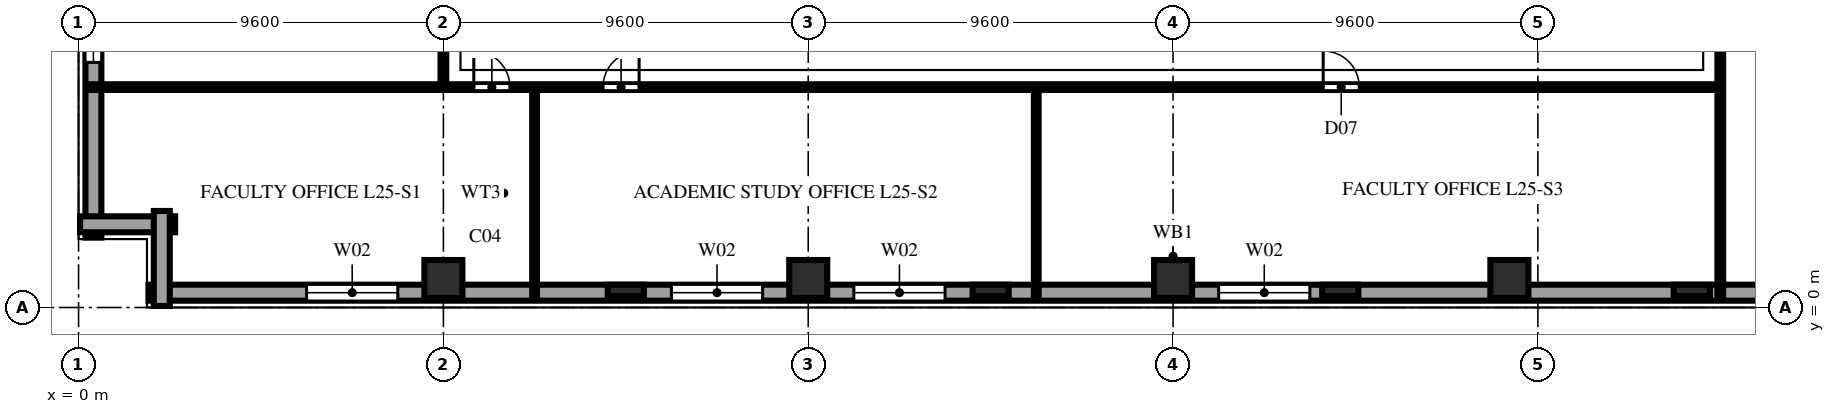
"""IFC4 building model, lengths in metres.
Left out: names, types, materials, properties, quantities, classifications, styles, units other than length and angle.
Written with IfcOpenShell. Run it as: python <this file> out.ifc"""

import sys

from ifc_helpers import new_model, si_unit, direction, frame, frame_2d, origin, origin_2d, place, context, subcontext, project, spatial, rectangle, extrude, element, fill, save


model = new_model("IFC4")
c1 = context("Model", 3, precision=1e-05, world=origin(), true_north=direction((0.0, 1.0)))
c2 = subcontext(c1, "Body", "Model", "MODEL_VIEW")
j1 = project(units=[si_unit("LENGTHUNIT", "METRE"), si_unit("PLANEANGLEUNIT", "RADIAN")], contexts=[c1])
p1 = place(None, origin())
s1 = spatial("IfcSite", under=j1, at=p1, CompositionType="ELEMENT")
p2 = place(p1, origin())
s2 = spatial("IfcBuilding", under=s1, at=p2, CompositionType="ELEMENT")
p3 = place(p2, frame((0.0, 0.0, 101.4)))
s3 = spatial("IfcBuildingStorey", under=s2, at=p3, CompositionType="ELEMENT", Elevation=101.4)
for number, where, z_axis, x_axis in (
    (1, (9.6, 0.75, 0.0), (0.0, 0.0, 1.0), (1.0, 0.0, 0.0)),
    (2, (19.2, 0.75, 0.0), (0.0, 0.0, 1.0), (1.0, 0.0, 0.0)),
    (3, (28.8, 0.75, 0.0), (0.0, 0.0, 1.0), (1.0, 0.0, 0.0)),
    (4, (37.65, 0.75, 0.0), (0.0, 0.0, 1.0), (1.0, 0.0, 0.0)),
):
    element("IfcColumn", number, at=place(p3, frame(where, z_axis=z_axis, x_axis=x_axis)), inside=s3, PredefinedType="COLUMN", context=c2, shape_type="SweptSolid", body=[
        extrude(rectangle(XDim=1.0, YDim=1.0, at=origin_2d()), origin(), (0.0, 0.0, 1.0), 3.8),
    ])
for number, where, z_axis, x_axis in (
    (5, (14.4, 0.45, 0.0), (0.0, 0.0, 1.0), (1.0, 0.0, 0.0)),
    (6, (24.0, 0.45, 0.0), (0.0, 0.0, 1.0), (1.0, 0.0, 0.0)),
    (7, (33.2, 0.45, 0.0), (0.0, 0.0, 1.0), (1.0, 0.0, 0.0)),
    (8, (42.45, 0.45, 0.0), (0.0, 0.0, 1.0), (1.0, 0.0, 0.0)),
):
    element("IfcColumn", number, at=place(p3, frame(where, z_axis=z_axis, x_axis=x_axis)), inside=s3, PredefinedType="PILASTER", context=c2, shape_type="SweptSolid", body=[
        extrude(rectangle(XDim=0.95, YDim=0.3, at=origin_2d()), origin(), (0.0, 0.0, 1.0), 3.8),
    ])
p4 = place(p3, frame((1.84, 0.39, 0.0), z_axis=(0.0, 0.0, 1.0), x_axis=(1.0, 0.0, 0.0)))
e9 = element("IfcWall", 9, at=p4, inside=s3, PredefinedType="SOLIDWALL", context=c2, shape_type="SweptSolid", body=[
    extrude(rectangle(XDim=53.92, YDim=0.42, at=frame_2d((26.96, 0.0))), origin(), (0.0, 0.0, 1.0), 3.54),
])
p5 = place(p4, frame((4.16, 0.0, 0.85)))
e10 = element("IfcOpeningElement", 10, at=p5, cuts=e9, PredefinedType="OPENING", context=c2, shape_type="SweptSolid", body=[
    extrude(rectangle(XDim=2.4, YDim=1.85, at=frame_2d((1.2, 0.925))), frame((0.0, 0.222, 0.0), z_axis=(0.0, -1.0, 0.0), x_axis=(1.0, 0.0, 0.0)), (0.0, 0.0, 1.0), 0.444),
])
p6 = place(p4, frame((13.76, 0.0, 0.85)))
e11 = element("IfcOpeningElement", 11, at=p6, cuts=e9, PredefinedType="OPENING", context=c2, shape_type="SweptSolid", body=[
    extrude(rectangle(XDim=2.4, YDim=1.85, at=frame_2d((1.2, 0.925))), frame((0.0, 0.222, 0.0), z_axis=(0.0, -1.0, 0.0), x_axis=(1.0, 0.0, 0.0)), (0.0, 0.0, 1.0), 0.444),
])
p7 = place(p4, frame((18.56, 0.0, 0.85)))
e12 = element("IfcOpeningElement", 12, at=p7, cuts=e9, PredefinedType="OPENING", context=c2, shape_type="SweptSolid", body=[
    extrude(rectangle(XDim=2.4, YDim=1.85, at=frame_2d((1.2, 0.925))), frame((0.0, 0.222, 0.0), z_axis=(0.0, -1.0, 0.0), x_axis=(1.0, 0.0, 0.0)), (0.0, 0.0, 1.0), 0.444),
])
p8 = place(p4, frame((28.16, 0.0, 0.85)))
e13 = element("IfcOpeningElement", 13, at=p8, cuts=e9, PredefinedType="OPENING", context=c2, shape_type="SweptSolid", body=[
    extrude(rectangle(XDim=2.4, YDim=1.85, at=frame_2d((1.2, 0.925))), frame((0.0, 0.222, 0.0), z_axis=(0.0, -1.0, 0.0), x_axis=(1.0, 0.0, 0.0)), (0.0, 0.0, 1.0), 0.444),
])
p9 = place(p3, frame((0.39, 65.36, 0.0), z_axis=(0.0, 0.0, 1.0), x_axis=(0.0, -1.0, 0.0)))
e14 = element("IfcWall", 14, at=p9, inside=s3, PredefinedType="SOLIDWALL", context=c2, shape_type="SweptSolid", body=[
    extrude(rectangle(XDim=63.52, YDim=0.42, at=frame_2d((31.76, 0.0))), origin(), (0.0, 0.0, 1.0), 3.54),
])
p10 = place(p9, frame((4.885, 0.0, 0.9)))
e15 = element("IfcOpeningElement", 15, at=p10, cuts=e14, PredefinedType="OPENING", context=c2, shape_type="SweptSolid", body=[
    extrude(rectangle(XDim=0.95, YDim=1.85, at=frame_2d((0.475, 0.925))), frame((0.0, 0.222, 0.0), z_axis=(0.0, -1.0, 0.0), x_axis=(1.0, 0.0, 0.0)), (0.0, 0.0, 1.0), 0.444),
])
p11 = place(p9, frame((9.41, 0.0, 0.9)))
e16 = element("IfcOpeningElement", 16, at=p11, cuts=e14, PredefinedType="OPENING", context=c2, shape_type="SweptSolid", body=[
    extrude(rectangle(XDim=1.5, YDim=1.85, at=frame_2d((0.75, 0.925))), frame((0.0, 0.222, 0.0), z_axis=(0.0, -1.0, 0.0), x_axis=(1.0, 0.0, 0.0)), (0.0, 0.0, 1.0), 0.444),
])
p12 = place(p9, frame((14.485, 0.0, 0.9)))
e17 = element("IfcOpeningElement", 17, at=p12, cuts=e14, PredefinedType="OPENING", context=c2, shape_type="SweptSolid", body=[
    extrude(rectangle(XDim=0.95, YDim=1.85, at=frame_2d((0.475, 0.925))), frame((0.0, 0.222, 0.0), z_axis=(0.0, -1.0, 0.0), x_axis=(1.0, 0.0, 0.0)), (0.0, 0.0, 1.0), 0.444),
])
p13 = place(p9, frame((19.01, 0.0, 0.9)))
e18 = element("IfcOpeningElement", 18, at=p13, cuts=e14, PredefinedType="OPENING", context=c2, shape_type="SweptSolid", body=[
    extrude(rectangle(XDim=1.5, YDim=1.85, at=frame_2d((0.75, 0.925))), frame((0.0, 0.222, 0.0), z_axis=(0.0, -1.0, 0.0), x_axis=(1.0, 0.0, 0.0)), (0.0, 0.0, 1.0), 0.444),
])
p14 = place(p9, frame((24.085, 0.0, 0.9)))
e19 = element("IfcOpeningElement", 19, at=p14, cuts=e14, PredefinedType="OPENING", context=c2, shape_type="SweptSolid", body=[
    extrude(rectangle(XDim=0.95, YDim=1.85, at=frame_2d((0.475, 0.925))), frame((0.0, 0.222, 0.0), z_axis=(0.0, -1.0, 0.0), x_axis=(1.0, 0.0, 0.0)), (0.0, 0.0, 1.0), 0.444),
])
p15 = place(p9, frame((28.61, 0.0, 0.9)))
e20 = element("IfcOpeningElement", 20, at=p15, cuts=e14, PredefinedType="OPENING", context=c2, shape_type="SweptSolid", body=[
    extrude(rectangle(XDim=1.5, YDim=1.85, at=frame_2d((0.75, 0.925))), frame((0.0, 0.222, 0.0), z_axis=(0.0, -1.0, 0.0), x_axis=(1.0, 0.0, 0.0)), (0.0, 0.0, 1.0), 0.444),
])
p16 = place(p9, frame((33.685, 0.0, 0.9)))
e21 = element("IfcOpeningElement", 21, at=p16, cuts=e14, PredefinedType="OPENING", context=c2, shape_type="SweptSolid", body=[
    extrude(rectangle(XDim=0.95, YDim=1.85, at=frame_2d((0.475, 0.925))), frame((0.0, 0.222, 0.0), z_axis=(0.0, -1.0, 0.0), x_axis=(1.0, 0.0, 0.0)), (0.0, 0.0, 1.0), 0.444),
])
p17 = place(p9, frame((38.21, 0.0, 0.9)))
e22 = element("IfcOpeningElement", 22, at=p17, cuts=e14, PredefinedType="OPENING", context=c2, shape_type="SweptSolid", body=[
    extrude(rectangle(XDim=1.5, YDim=1.85, at=frame_2d((0.75, 0.925))), frame((0.0, 0.222, 0.0), z_axis=(0.0, -1.0, 0.0), x_axis=(1.0, 0.0, 0.0)), (0.0, 0.0, 1.0), 0.444),
])
p18 = place(p9, frame((43.285, 0.0, 0.9)))
e23 = element("IfcOpeningElement", 23, at=p18, cuts=e14, PredefinedType="OPENING", context=c2, shape_type="SweptSolid", body=[
    extrude(rectangle(XDim=0.95, YDim=1.85, at=frame_2d((0.475, 0.925))), frame((0.0, 0.222, 0.0), z_axis=(0.0, -1.0, 0.0), x_axis=(1.0, 0.0, 0.0)), (0.0, 0.0, 1.0), 0.444),
])
p19 = place(p9, frame((47.81, 0.0, 0.9)))
e24 = element("IfcOpeningElement", 24, at=p19, cuts=e14, PredefinedType="OPENING", context=c2, shape_type="SweptSolid", body=[
    extrude(rectangle(XDim=1.5, YDim=1.85, at=frame_2d((0.75, 0.925))), frame((0.0, 0.222, 0.0), z_axis=(0.0, -1.0, 0.0), x_axis=(1.0, 0.0, 0.0)), (0.0, 0.0, 1.0), 0.444),
])
p20 = place(p9, frame((52.885, 0.0, 0.9)))
e25 = element("IfcOpeningElement", 25, at=p20, cuts=e14, PredefinedType="OPENING", context=c2, shape_type="SweptSolid", body=[
    extrude(rectangle(XDim=0.95, YDim=1.85, at=frame_2d((0.475, 0.925))), frame((0.0, 0.222, 0.0), z_axis=(0.0, -1.0, 0.0), x_axis=(1.0, 0.0, 0.0)), (0.0, 0.0, 1.0), 0.444),
])
p21 = place(p9, frame((57.41, 0.0, 0.9)))
e26 = element("IfcOpeningElement", 26, at=p21, cuts=e14, PredefinedType="OPENING", context=c2, shape_type="SweptSolid", body=[
    extrude(rectangle(XDim=1.5, YDim=1.85, at=frame_2d((0.75, 0.925))), frame((0.0, 0.222, 0.0), z_axis=(0.0, -1.0, 0.0), x_axis=(1.0, 0.0, 0.0)), (0.0, 0.0, 1.0), 0.444),
])
for number, where, z_axis, x_axis in (
    (27, (0.04, 2.19, 0.0), (0.0, 0.0, 1.0), (1.0, 0.0, 0.0)),
    (28, (2.19, 2.54, 0.0), (0.0, 0.0, 1.0), (0.0, -1.0, 0.0)),
):
    element("IfcWall", number, at=place(p3, frame(where, z_axis=z_axis, x_axis=x_axis)), inside=s3, PredefinedType="SOLIDWALL", context=c2, shape_type="SweptSolid", body=[
        extrude(rectangle(XDim=2.5, YDim=0.42, at=frame_2d((1.25, 0.0))), origin(), (0.0, 0.0, 1.0), 3.54),
    ])
p22 = place(p3, frame((9.6, 5.8, 0.0), z_axis=(0.0, 0.0, 1.0), x_axis=(0.0, 1.0, 0.0)))
e29 = element("IfcWall", 29, at=p22, inside=s3, PredefinedType="PARTITIONING", context=c2, shape_type="SweptSolid", body=[
    extrude(rectangle(XDim=3.8, YDim=0.15, at=frame_2d((1.9, 0.0))), origin(), (0.0, 0.0, 1.0), 3.123),
])
for number, where, z_axis, x_axis in (
    (30, (12.0, 0.22, 0.0), (0.0, 0.0, 1.0), (0.0, 1.0, 0.0)),
    (31, (25.2, 0.22, 0.0), (0.0, 0.0, 1.0), (0.0, 1.0, 0.0)),
):
    element("IfcWall", number, at=place(p3, frame(where, z_axis=z_axis, x_axis=x_axis)), inside=s3, PredefinedType="PARTITIONING", context=c2, shape_type="SweptSolid", body=[
        extrude(rectangle(XDim=5.58, YDim=0.125, at=frame_2d((2.79, 0.0))), origin(), (0.0, 0.0, 1.0), 3.54),
    ])
p23 = place(p3, frame((0.22, 5.8, 0.0), z_axis=(0.0, 0.0, 1.0), x_axis=(1.0, 0.0, 0.0)))
e32 = element("IfcWall", 32, at=p23, inside=s3, PredefinedType="PARTITIONING", context=c2, shape_type="SweptSolid", body=[
    extrude(rectangle(XDim=42.98, YDim=0.15, at=frame_2d((21.49, 0.0))), origin(), (0.0, 0.0, 1.0), 3.54),
])
p24 = place(p23, frame((10.18, 0.0, 0.0)))
e33 = element("IfcOpeningElement", 33, at=p24, cuts=e32, PredefinedType="OPENING", context=c2, shape_type="SweptSolid", body=[
    extrude(rectangle(XDim=0.95, YDim=2.15, at=frame_2d((0.475, 1.075))), frame((0.0, 0.087, 0.0), z_axis=(0.0, -1.0, 0.0), x_axis=(1.0, 0.0, 0.0)), (0.0, 0.0, 1.0), 0.174),
])
p25 = place(p23, frame((13.58, 0.0, 0.0)))
e34 = element("IfcOpeningElement", 34, at=p25, cuts=e32, PredefinedType="OPENING", context=c2, shape_type="SweptSolid", body=[
    extrude(rectangle(XDim=0.95, YDim=2.15, at=frame_2d((0.475, 1.075))), frame((0.0, 0.087, 0.0), z_axis=(0.0, -1.0, 0.0), x_axis=(1.0, 0.0, 0.0)), (0.0, 0.0, 1.0), 0.174),
])
p26 = place(p23, frame((32.53, 0.0, 0.0)))
e35 = element("IfcOpeningElement", 35, at=p26, cuts=e32, PredefinedType="OPENING", context=c2, shape_type="SweptSolid", body=[
    extrude(rectangle(XDim=0.95, YDim=2.15, at=frame_2d((0.475, 1.075))), frame((0.0, 0.087, 0.0), z_axis=(0.0, -1.0, 0.0), x_axis=(1.0, 0.0, 0.0)), (0.0, 0.0, 1.0), 0.174),
])
p27 = place(p3, frame((43.2, 0.22, 0.0), z_axis=(0.0, 0.0, 1.0), x_axis=(0.0, 1.0, 0.0)))
e36 = element("IfcWall", 36, at=p27, inside=s3, PredefinedType="PARTITIONING", context=c2, shape_type="SweptSolid", body=[
    extrude(rectangle(XDim=37.96, YDim=0.15, at=frame_2d((18.98, 0.0))), origin(), (0.0, 0.0, 1.0), 3.54),
])
p28 = place(p27, frame((13.63, 0.0, 0.0)))
e37 = element("IfcOpeningElement", 37, at=p28, cuts=e36, PredefinedType="OPENING", context=c2, shape_type="SweptSolid", body=[
    extrude(rectangle(XDim=0.95, YDim=2.15, at=frame_2d((0.475, 1.075))), frame((0.0, 0.087, 0.0), z_axis=(0.0, -1.0, 0.0), x_axis=(1.0, 0.0, 0.0)), (0.0, 0.0, 1.0), 0.174),
])
p29 = place(p5, origin())
e38 = element("IfcWindow", 38, at=p29, inside=s3, PartitioningType="TRIPLE_PANEL_VERTICAL", PredefinedType="WINDOW", context=c2, shape_type="SweptSolid", body=[
    extrude(rectangle(XDim=2.4, YDim=1.85, at=frame_2d((1.2, 0.925))), frame((0.0, 0.11, 0.0), z_axis=(0.0, -1.0, 0.0), x_axis=(1.0, 0.0, 0.0)), (0.0, 0.0, 1.0), 0.06),
])
fill(e10, e38)
p30 = place(p6, origin())
e39 = element("IfcWindow", 39, at=p30, inside=s3, PartitioningType="TRIPLE_PANEL_VERTICAL", PredefinedType="WINDOW", context=c2, shape_type="SweptSolid", body=[
    extrude(rectangle(XDim=2.4, YDim=1.85, at=frame_2d((1.2, 0.925))), frame((0.0, 0.11, 0.0), z_axis=(0.0, -1.0, 0.0), x_axis=(1.0, 0.0, 0.0)), (0.0, 0.0, 1.0), 0.06),
])
fill(e11, e39)
p31 = place(p7, origin())
e40 = element("IfcWindow", 40, at=p31, inside=s3, PartitioningType="TRIPLE_PANEL_VERTICAL", PredefinedType="WINDOW", context=c2, shape_type="SweptSolid", body=[
    extrude(rectangle(XDim=2.4, YDim=1.85, at=frame_2d((1.2, 0.925))), frame((0.0, 0.11, 0.0), z_axis=(0.0, -1.0, 0.0), x_axis=(1.0, 0.0, 0.0)), (0.0, 0.0, 1.0), 0.06),
])
fill(e12, e40)
p32 = place(p8, origin())
e41 = element("IfcWindow", 41, at=p32, inside=s3, PartitioningType="TRIPLE_PANEL_VERTICAL", PredefinedType="WINDOW", context=c2, shape_type="SweptSolid", body=[
    extrude(rectangle(XDim=2.4, YDim=1.85, at=frame_2d((1.2, 0.925))), frame((0.0, 0.11, 0.0), z_axis=(0.0, -1.0, 0.0), x_axis=(1.0, 0.0, 0.0)), (0.0, 0.0, 1.0), 0.06),
])
fill(e13, e41)
p33 = place(p21, origin())
e42 = element("IfcWindow", 42, at=p33, inside=s3, PartitioningType="DOUBLE_PANEL_VERTICAL", PredefinedType="WINDOW", context=c2, shape_type="SweptSolid", body=[
    extrude(rectangle(XDim=1.5, YDim=1.85, at=frame_2d((0.75, 0.925))), frame((0.0, 0.11, 0.0), z_axis=(0.0, -1.0, 0.0), x_axis=(1.0, 0.0, 0.0)), (0.0, 0.0, 1.0), 0.06),
])
fill(e26, e42)
p34 = place(p24, origin())
e43 = element("IfcDoor", 43, at=p34, inside=s3, OperationType="SINGLE_SWING_LEFT", PredefinedType="DOOR", context=c2, shape_type="SweptSolid", body=[
    extrude(rectangle(XDim=0.95, YDim=2.15, at=frame_2d((0.475, 1.075))), frame((0.0, 0.025, 0.0), z_axis=(0.0, -1.0, 0.0), x_axis=(1.0, 0.0, 0.0)), (0.0, 0.0, 1.0), 0.05),
])
fill(e33, e43)
p35 = place(p25, origin())
e44 = element("IfcDoor", 44, at=p35, inside=s3, OperationType="SINGLE_SWING_RIGHT", PredefinedType="DOOR", context=c2, shape_type="SweptSolid", body=[
    extrude(rectangle(XDim=0.95, YDim=2.15, at=frame_2d((0.475, 1.075))), frame((0.0, 0.025, 0.0), z_axis=(0.0, -1.0, 0.0), x_axis=(1.0, 0.0, 0.0)), (0.0, 0.0, 1.0), 0.05),
])
fill(e34, e44)
p36 = place(p26, origin())
e45 = element("IfcDoor", 45, at=p36, inside=s3, OperationType="SINGLE_SWING_LEFT", PredefinedType="DOOR", context=c2, shape_type="SweptSolid", body=[
    extrude(rectangle(XDim=0.95, YDim=2.15, at=frame_2d((0.475, 1.075))), frame((0.0, 0.025, 0.0), z_axis=(0.0, -1.0, 0.0), x_axis=(1.0, 0.0, 0.0)), (0.0, 0.0, 1.0), 0.05),
])
fill(e35, e45)
save(model, sys.argv[1])
